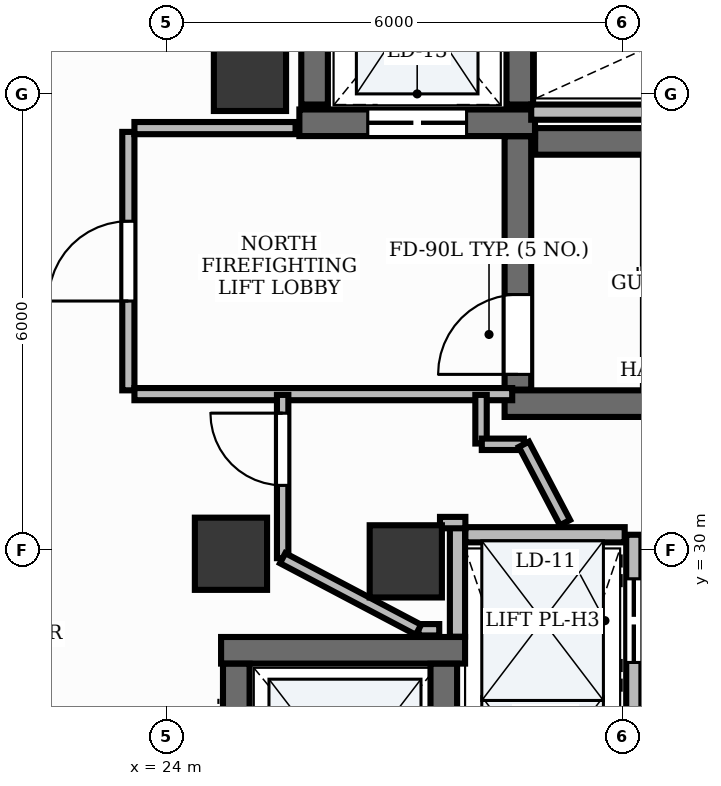
"""IFC4 building model, lengths in metres.
Left out: names, types, materials, properties, quantities, classifications, styles, units other than length and angle.
Written with IfcOpenShell. Run it as: python <this file> out.ifc"""

import sys

from ifc_helpers import new_model, si_unit, direction, frame, frame_2d, origin, origin_2d, place, context, subcontext, project, spatial, rectangle, extrude, element, fill, save


model = new_model("IFC4")
c1 = context("Model", 3, precision=1e-05, world=origin(), true_north=direction((0.0, 1.0)))
c2 = subcontext(c1, "Body", "Model", "MODEL_VIEW")
j1 = project(units=[si_unit("LENGTHUNIT", "METRE"), si_unit("PLANEANGLEUNIT", "RADIAN")], contexts=[c1])
p1 = place(None, origin())
s1 = spatial("IfcSite", under=j1, at=p1, CompositionType="ELEMENT")
p2 = place(p1, origin())
s2 = spatial("IfcBuilding", under=s1, at=p2, CompositionType="ELEMENT")
p3 = place(p2, frame((0.0, 0.0, 306.0)))
s3 = spatial("IfcBuildingStorey", under=s2, at=p3, CompositionType="ELEMENT", Elevation=306.0)
p4 = place(p3, frame((28.852, 35.375, 0.0), z_axis=(0.0, 0.0, 1.0), x_axis=(1.0, 0.0, 0.0)))
e1 = element("IfcWall", 1, at=p4, inside=s3, PredefinedType="SHEAR", context=c2, shape_type="SweptSolid", body=[
    extrude(rectangle(XDim=8.148, YDim=0.35, at=frame_2d((4.074, 0.0))), origin(), (0.0, 0.0, 1.0), 3.9),
])
p5 = place(p3, frame((28.45, 31.925, 0.0), z_axis=(0.0, 0.0, 1.0), x_axis=(1.0, 0.0, 0.0)))
e2 = element("IfcWall", 2, at=p5, inside=s3, PredefinedType="SHEAR", context=c2, shape_type="SweptSolid", body=[
    extrude(rectangle(XDim=8.55, YDim=0.35, at=frame_2d((4.275, 0.0))), origin(), (0.0, 0.0, 1.0), 3.9),
])
p6 = place(p3, frame((28.625, 32.11, 0.0), z_axis=(0.0, 0.0, 1.0), x_axis=(0.0, 1.0, 0.0)))
e3 = element("IfcWall", 3, at=p6, inside=s3, PredefinedType="SHEAR", context=c2, shape_type="SweptSolid", body=[
    extrude(rectangle(XDim=3.333, YDim=0.35, at=frame_2d((1.667, 0.0))), origin(), (0.0, 0.0, 1.0), 3.9),
])
p7 = place(p6, frame((0.2, 0.0, 0.0)))
e4 = element("IfcOpeningElement", 4, at=p7, cuts=e3, PredefinedType="OPENING", context=c2, shape_type="SweptSolid", body=[
    extrude(rectangle(XDim=1.05, YDim=2.15, at=frame_2d((0.525, 1.075))), frame((0.0, 0.19, 0.0), z_axis=(0.0, -1.0, 0.0), x_axis=(1.0, 0.0, 0.0)), (0.0, 0.0, 1.0), 0.38),
])
p8 = place(p3, frame((25.75, 35.62, 0.0), z_axis=(0.0, 0.0, 1.0), x_axis=(1.0, 0.0, 0.0)))
e5 = element("IfcWall", 5, at=p8, inside=s3, PredefinedType="SHEAR", context=c2, shape_type="SweptSolid", body=[
    extrude(rectangle(XDim=3.1, YDim=0.35, at=frame_2d((1.55, 0.0))), origin(), (0.0, 0.0, 1.0), 3.9),
])
p9 = place(p8, frame((0.9, 0.0, 0.0)))
e6 = element("IfcOpeningElement", 6, at=p9, cuts=e5, PredefinedType="OPENING", context=c2, shape_type="SweptSolid", body=[
    extrude(rectangle(XDim=1.3, YDim=2.2, at=frame_2d((0.65, 1.1))), frame((0.0, 0.19, 0.0), z_axis=(0.0, -1.0, 0.0), x_axis=(1.0, 0.0, 0.0)), (0.0, 0.0, 1.0), 0.38),
])
for number, where, z_axis, x_axis in (
    (7, (25.95, 35.86, 0.0), (0.0, 0.0, 1.0), (0.0, 1.0, 0.0)),
    (8, (28.65, 35.86, 0.0), (0.0, 0.0, 1.0), (0.0, 1.0, 0.0)),
):
    element("IfcWall", number, at=place(p3, frame(where, z_axis=z_axis, x_axis=x_axis)), inside=s3, PredefinedType="SHEAR", context=c2, shape_type="SweptSolid", body=[
        extrude(rectangle(XDim=2.7, YDim=0.35, at=frame_2d((1.35, 0.0))), origin(), (0.0, 0.0, 1.0), 3.9),
    ])
p10 = place(p3, frame((24.72, 28.68, 0.0), z_axis=(0.0, 0.0, 1.0), x_axis=(1.0, 0.0, 0.0)))
e9 = element("IfcWall", 9, at=p10, inside=s3, PredefinedType="SHEAR", context=c2, shape_type="SweptSolid", body=[
    extrude(rectangle(XDim=3.21, YDim=0.35, at=frame_2d((1.605, 0.0))), origin(), (0.0, 0.0, 1.0), 3.9),
])
p11 = place(p3, frame((24.92, 25.497, 0.0), z_axis=(0.0, 0.0, 1.0), x_axis=(0.0, 1.0, 0.0)))
e10 = element("IfcWall", 10, at=p11, inside=s3, PredefinedType="SHEAR", context=c2, shape_type="SweptSolid", body=[
    extrude(rectangle(XDim=3.006, YDim=0.35, at=frame_2d((1.503, 0.0))), origin(), (0.0, 0.0, 1.0), 3.9),
])
p12 = place(p11, frame((0.79, 0.0, 0.0)))
e11 = element("IfcOpeningElement", 11, at=p12, cuts=e10, PredefinedType="OPENING", context=c2, shape_type="SweptSolid", body=[
    extrude(rectangle(XDim=1.3, YDim=2.2, at=frame_2d((0.65, 1.1))), frame((0.0, 0.19, 0.0), z_axis=(0.0, -1.0, 0.0), x_axis=(1.0, 0.0, 0.0)), (0.0, 0.0, 1.0), 0.38),
])
p13 = place(p3, frame((27.65, 25.497, 0.0), z_axis=(0.0, 0.0, 1.0), x_axis=(0.0, 1.0, 0.0)))
e12 = element("IfcWall", 12, at=p13, inside=s3, PredefinedType="SHEAR", context=c2, shape_type="SweptSolid", body=[
    extrude(rectangle(XDim=3.006, YDim=0.35, at=frame_2d((1.503, 0.0))), origin(), (0.0, 0.0, 1.0), 3.9),
])
for number, where, z_axis, x_axis in (
    (13, (25.1, 36.25, -0.0), (0.0, 0.0, 1.0), (1.0, 0.0, 0.0)),
    (14, (24.85, 29.95, -0.0), (0.0, 0.0, 1.0), (1.0, 0.0, 0.0)),
    (15, (27.15, 29.85, -0.0), (0.0, 0.0, 1.0), (1.0, 0.0, 0.0)),
):
    element("IfcColumn", number, at=place(p3, frame(where, z_axis=z_axis, x_axis=x_axis)), inside=s3, PredefinedType="PILASTER", context=c2, shape_type="SweptSolid", body=[
        extrude(rectangle(XDim=0.95, YDim=0.95, at=origin_2d()), origin(), (0.0, 0.0, 1.0), 3.901),
    ])
p14 = place(p3, frame((27.83, 28.859, 0.0), z_axis=(0.0, 0.0, 1.0), x_axis=(0.0, 1.0, 0.0)))
e16 = element("IfcWall", 16, at=p14, inside=s3, PredefinedType="PARTITIONING", context=c2, shape_type="SweptSolid", body=[
    extrude(rectangle(XDim=1.441, YDim=0.2, at=frame_2d((0.721, 0.0))), origin(), (0.0, 0.0, 1.0), 2.91),
])
p15 = place(p3, frame((30.15, 23.85, 0.0), z_axis=(0.0, 0.0, 1.0), x_axis=(0.0, 1.0, 0.0)))
e17 = element("IfcWall", 17, at=p15, inside=s3, PredefinedType="PARTITIONING", context=c2, shape_type="SweptSolid", body=[
    extrude(rectangle(XDim=6.35, YDim=0.2, at=frame_2d((3.175, 0.0))), origin(), (0.0, 0.0, 1.0), 2.91),
])
p16 = place(p15, frame((0.58, 0.0, 0.0)))
e18 = element("IfcOpeningElement", 18, at=p16, cuts=e17, PredefinedType="OPENING", context=c2, shape_type="SweptSolid", body=[
    extrude(rectangle(XDim=1.1, YDim=2.2, at=frame_2d((0.55, 1.1))), frame((0.0, 0.115, 0.0), z_axis=(0.0, -1.0, 0.0), x_axis=(1.0, 0.0, 0.0)), (0.0, 0.0, 1.0), 0.23),
])
p17 = place(p15, frame((2.62, 0.0, 0.0)))
e19 = element("IfcOpeningElement", 19, at=p17, cuts=e17, PredefinedType="OPENING", context=c2, shape_type="SweptSolid", body=[
    extrude(rectangle(XDim=1.1, YDim=2.2, at=frame_2d((0.55, 1.1))), frame((0.0, 0.115, 0.0), z_axis=(0.0, -1.0, 0.0), x_axis=(1.0, 0.0, 0.0)), (0.0, 0.0, 1.0), 0.23),
])
p18 = place(p15, frame((4.67, 0.0, 0.0)))
e20 = element("IfcOpeningElement", 20, at=p18, cuts=e17, PredefinedType="OPENING", context=c2, shape_type="SweptSolid", body=[
    extrude(rectangle(XDim=1.1, YDim=2.2, at=frame_2d((0.55, 1.1))), frame((0.0, 0.115, 0.0), z_axis=(0.0, -1.0, 0.0), x_axis=(1.0, 0.0, 0.0)), (0.0, 0.0, 1.0), 0.23),
])
p19 = place(p3, frame((27.934, 30.2, 0.0), z_axis=(0.0, 0.0, 1.0), x_axis=(1.0, 0.0, 0.0)))
e21 = element("IfcWall", 21, at=p19, inside=s3, PredefinedType="PARTITIONING", context=c2, shape_type="SweptSolid", body=[
    extrude(rectangle(XDim=2.096, YDim=0.2, at=frame_2d((1.048, 0.0))), origin(), (0.0, 0.0, 1.0), 2.91),
])
p20 = place(p3, frame((28.8, 35.76, 0.0), z_axis=(0.0, 0.0, 1.0), x_axis=(1.0, 0.0, 0.0)))
e22 = element("IfcWall", 22, at=p20, inside=s3, PredefinedType="PARTITIONING", context=c2, shape_type="SweptSolid", body=[
    extrude(rectangle(XDim=4.57, YDim=0.2, at=frame_2d((2.285, 0.0))), origin(), (0.0, 0.0, 1.0), 2.91),
])
p21 = place(p3, frame((23.5, 32.1, 0.0), z_axis=(0.0, 0.0, 1.0), x_axis=(0.0, 1.0, 0.0)))
e23 = element("IfcWall", 23, at=p21, inside=s3, PredefinedType="PARTITIONING", context=c2, shape_type="SweptSolid", body=[
    extrude(rectangle(XDim=3.4, YDim=0.16, at=frame_2d((1.7, 0.0))), origin(), (0.0, 0.0, 1.0), 2.91),
])
p22 = place(p21, frame((1.175, 0.0, 0.0)))
e24 = element("IfcOpeningElement", 24, at=p22, cuts=e23, PredefinedType="OPENING", context=c2, shape_type="SweptSolid", body=[
    extrude(rectangle(XDim=1.05, YDim=2.15, at=frame_2d((0.525, 1.075))), frame((0.0, 0.095, 0.0), z_axis=(0.0, -1.0, 0.0), x_axis=(1.0, 0.0, 0.0)), (0.0, 0.0, 1.0), 0.19),
])
p23 = place(p3, frame((23.58, 32.05, 0.0), z_axis=(0.0, 0.0, 1.0), x_axis=(1.0, 0.0, 0.0)))
e25 = element("IfcWall", 25, at=p23, inside=s3, PredefinedType="PARTITIONING", context=c2, shape_type="SweptSolid", body=[
    extrude(rectangle(XDim=4.97, YDim=0.16, at=frame_2d((2.485, 0.0))), origin(), (0.0, 0.0, 1.0), 2.91),
])
p24 = place(p3, frame((23.58, 35.55, 0.0), z_axis=(0.0, 0.0, 1.0), x_axis=(1.0, 0.0, 0.0)))
e26 = element("IfcWall", 26, at=p24, inside=s3, PredefinedType="PARTITIONING", context=c2, shape_type="SweptSolid", body=[
    extrude(rectangle(XDim=2.12, YDim=0.16, at=frame_2d((1.06, 0.0))), origin(), (0.0, 0.0, 1.0), 2.91),
])
p25 = place(p3, frame((25.53, 29.892, 0.0), z_axis=(0.0, 0.0, 1.0), x_axis=(0.0, 1.0, 0.0)))
e27 = element("IfcWall", 27, at=p25, inside=s3, PredefinedType="PARTITIONING", context=c2, shape_type="SweptSolid", body=[
    extrude(rectangle(XDim=2.148, YDim=0.15, at=frame_2d((1.074, 0.0))), origin(), (0.0, 0.0, 1.0), 2.91),
])
p26 = place(p25, frame((0.958, 0.0, 0.0)))
e28 = element("IfcOpeningElement", 28, at=p26, cuts=e27, PredefinedType="OPENING", context=c2, shape_type="SweptSolid", body=[
    extrude(rectangle(XDim=0.95, YDim=2.15, at=frame_2d((0.475, 1.075))), frame((0.0, 0.09, 0.0), z_axis=(0.0, -1.0, 0.0), x_axis=(1.0, 0.0, 0.0)), (0.0, 0.0, 1.0), 0.18),
])
p27 = place(p3, frame((27.934, 30.36, 0.0), z_axis=(0.0, 0.0, 1.0), x_axis=(-1.0, 0.0, 0.0)))
e29 = element("IfcWall", 29, at=p27, inside=s3, PredefinedType="PARTITIONING", context=c2, shape_type="SweptSolid", body=[
    extrude(rectangle(XDim=0.334, YDim=0.15, at=frame_2d((0.167, 0.0))), origin(), (0.0, 0.0, 1.0), 2.91),
])
p28 = place(p3, frame((27.59, 28.95, 0.0), z_axis=(0.0, 0.0, 1.0), x_axis=(-1.0, 0.0, 0.0)))
e30 = element("IfcWall", 30, at=p28, inside=s3, PredefinedType="PARTITIONING", context=c2, shape_type="SweptSolid", body=[
    extrude(rectangle(XDim=0.273, YDim=0.15, at=frame_2d((0.137, 0.0))), origin(), (0.0, 0.0, 1.0), 2.91),
])
p29 = place(p3, frame((27.317, 28.95, 0.0), z_axis=(0.0, 0.0, 1.0), x_axis=(-0.884548245422, 0.466448712638, 0.0)))
e31 = element("IfcWall", 31, at=p29, inside=s3, PredefinedType="PARTITIONING", context=c2, shape_type="SweptSolid", body=[
    extrude(rectangle(XDim=2.02, YDim=0.15, at=frame_2d((1.01, 0.0))), origin(), (0.0, 0.0, 1.0), 2.91),
])
p30 = place(p3, frame((28.14, 32.04, 0.0), z_axis=(0.0, 0.0, 1.0), x_axis=(0.0, -1.0, 0.0)))
e32 = element("IfcWall", 32, at=p30, inside=s3, PredefinedType="PARTITIONING", context=c2, shape_type="SweptSolid", body=[
    extrude(rectangle(XDim=0.64, YDim=0.15, at=frame_2d((0.32, 0.0))), origin(), (0.0, 0.0, 1.0), 2.91),
])
p31 = place(p3, frame((28.15, 31.39, 0.0), z_axis=(0.0, 0.0, 1.0), x_axis=(1.0, 0.0, 0.0)))
e33 = element("IfcWall", 33, at=p31, inside=s3, PredefinedType="PARTITIONING", context=c2, shape_type="SweptSolid", body=[
    extrude(rectangle(XDim=0.554, YDim=0.15, at=frame_2d((0.277, 0.0))), origin(), (0.0, 0.0, 1.0), 2.91),
])
p32 = place(p3, frame((28.704, 31.39, 0.0), z_axis=(0.0, 0.0, 1.0), x_axis=(0.464924396498, -0.885350385746, 0.0)))
e34 = element("IfcWall", 34, at=p32, inside=s3, PredefinedType="PARTITIONING", context=c2, shape_type="SweptSolid", body=[
    extrude(rectangle(XDim=1.163, YDim=0.15, at=frame_2d((0.582, 0.0))), origin(), (0.0, 0.0, 1.0), 2.91),
])
p33 = place(p7, origin())
e35 = element("IfcDoor", 35, at=p33, inside=s3, OperationType="SINGLE_SWING_LEFT", PredefinedType="DOOR", context=c2, shape_type="SweptSolid", body=[
    extrude(rectangle(XDim=1.05, YDim=2.15, at=frame_2d((0.525, 1.075))), frame((0.0, 0.025, 0.0), z_axis=(0.0, -1.0, 0.0), x_axis=(1.0, 0.0, 0.0)), (0.0, 0.0, 1.0), 0.05),
])
fill(e4, e35)
p34 = place(p18, origin())
e36 = element("IfcDoor", 36, at=p34, inside=s3, OperationType="DOUBLE_DOOR_SLIDING", PredefinedType="DOOR", context=c2, shape_type="SweptSolid", body=[
    extrude(rectangle(XDim=1.1, YDim=2.2, at=frame_2d((0.55, 1.1))), frame((0.0, 0.025, 0.0), z_axis=(0.0, -1.0, 0.0), x_axis=(1.0, 0.0, 0.0)), (0.0, 0.0, 1.0), 0.05),
])
fill(e20, e36)
p35 = place(p9, origin())
e37 = element("IfcDoor", 37, at=p35, inside=s3, OperationType="DOUBLE_DOOR_SLIDING", PredefinedType="DOOR", context=c2, shape_type="SweptSolid", body=[
    extrude(rectangle(XDim=1.3, YDim=2.2, at=frame_2d((0.65, 1.1))), frame((0.0, 0.025, 0.0), z_axis=(0.0, -1.0, 0.0), x_axis=(1.0, 0.0, 0.0)), (0.0, 0.0, 1.0), 0.05),
])
fill(e6, e37)
p36 = place(p22, origin())
e38 = element("IfcDoor", 38, at=p36, inside=s3, OperationType="SINGLE_SWING_LEFT", PredefinedType="DOOR", context=c2, shape_type="SweptSolid", body=[
    extrude(rectangle(XDim=1.05, YDim=2.15, at=frame_2d((0.525, 1.075))), frame((0.0, 0.025, 0.0), z_axis=(0.0, -1.0, 0.0), x_axis=(1.0, 0.0, 0.0)), (0.0, 0.0, 1.0), 0.05),
])
fill(e24, e38)
p37 = place(p26, origin())
e39 = element("IfcDoor", 39, at=p37, inside=s3, OperationType="SINGLE_SWING_RIGHT", PredefinedType="DOOR", context=c2, shape_type="SweptSolid", body=[
    extrude(rectangle(XDim=0.95, YDim=2.15, at=frame_2d((0.475, 1.075))), frame((0.0, 0.025, 0.0), z_axis=(0.0, -1.0, 0.0), x_axis=(1.0, 0.0, 0.0)), (0.0, 0.0, 1.0), 0.05),
])
fill(e28, e39)
save(model, sys.argv[1])
